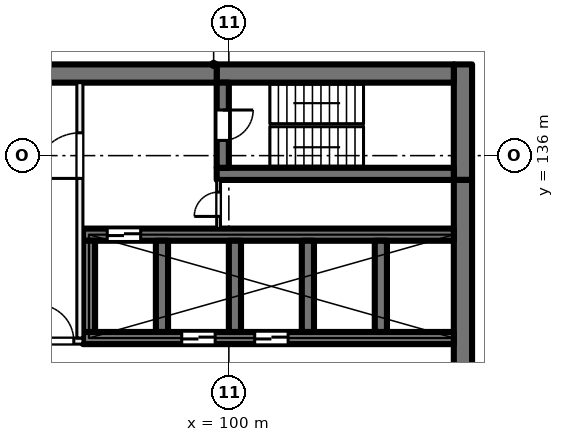
"""IFC4 building model, lengths in metres.
Left out: names, types, materials, properties, quantities, classifications, styles, units other than length and angle.
Written with IfcOpenShell. Run it as: python <this file> out.ifc"""

import sys

from ifc_helpers import new_model, si_unit, direction, frame, frame_2d, origin, place, context, subcontext, project, spatial, rectangle, extrude, element, fill, save


model = new_model("IFC4")
c1 = context("Model", 3, precision=1e-05, world=origin(), true_north=direction((0.0, 1.0)))
c2 = subcontext(c1, "Body", "Model", "MODEL_VIEW")
j1 = project(units=[si_unit("LENGTHUNIT", "METRE"), si_unit("PLANEANGLEUNIT", "RADIAN")], contexts=[c1])
p1 = place(None, origin())
s1 = spatial("IfcSite", under=j1, at=p1, CompositionType="ELEMENT")
p2 = place(p1, origin())
s2 = spatial("IfcBuilding", under=s1, at=p2, CompositionType="ELEMENT")
p3 = place(p2, frame((0.0, 0.0, 27.5)))
s3 = spatial("IfcBuildingStorey", under=s2, at=p3, CompositionType="ELEMENT", Elevation=27.5)
p4 = place(p3, frame((107.7, 139.0, 0.0), z_axis=(0.0, 0.0, 1.0), x_axis=(0.0, -1.0, 0.0)))
e1 = element("IfcWall", 1, at=p4, inside=s3, PredefinedType="SHEAR", context=c2, shape_type="SweptSolid", body=[
    extrude(rectangle(XDim=3.8, YDim=0.6, at=frame_2d((1.9, 0.0))), origin(), (0.0, 0.0, 1.0), 4.0),
])
p5 = place(p3, frame((107.7, 135.2, 0.0), z_axis=(0.0, 0.0, 1.0), x_axis=(0.0, -1.0, 0.0)))
e2 = element("IfcWall", 2, at=p5, inside=s3, PredefinedType="SHEAR", context=c2, shape_type="SweptSolid", body=[
    extrude(rectangle(XDim=14.4, YDim=0.6, at=frame_2d((7.2, 0.0))), origin(), (0.0, 0.0, 1.0), 4.0),
])
p6 = place(p3, frame((107.4, 138.7, 0.0), z_axis=(0.0, 0.0, 1.0), x_axis=(-1.0, 0.0, 0.0)))
e3 = element("IfcWall", 3, at=p6, inside=s3, PredefinedType="SHEAR", context=c2, shape_type="SweptSolid", body=[
    extrude(rectangle(XDim=7.8, YDim=0.6, at=frame_2d((3.9, 0.0))), origin(), (0.0, 0.0, 1.0), 4.0),
])
p7 = place(p3, frame((99.6, 138.7, 0.0), z_axis=(0.0, 0.0, 1.0), x_axis=(-1.0, 0.0, 0.0)))
e4 = element("IfcWall", 4, at=p7, inside=s3, PredefinedType="SHEAR", context=c2, shape_type="SweptSolid", body=[
    extrude(rectangle(XDim=8.9, YDim=0.6, at=frame_2d((4.45, 0.0))), origin(), (0.0, 0.0, 1.0), 4.0),
])
p8 = place(p3, frame((107.4, 135.4, 0.0), z_axis=(0.0, 0.0, 1.0), x_axis=(-1.0, 0.0, 0.0)))
e5 = element("IfcWall", 5, at=p8, inside=s3, PredefinedType="SHEAR", context=c2, shape_type="SweptSolid", body=[
    extrude(rectangle(XDim=7.8, YDim=0.4, at=frame_2d((3.9, 0.0))), origin(), (0.0, 0.0, 1.0), 4.0),
])
p9 = place(p3, frame((99.8, 138.4, 0.0), z_axis=(0.0, 0.0, 1.0), x_axis=(0.0, -1.0, 0.0)))
e6 = element("IfcWall", 6, at=p9, inside=s3, PredefinedType="SHEAR", context=c2, shape_type="SweptSolid", body=[
    extrude(rectangle(XDim=2.8, YDim=0.4, at=frame_2d((1.4, 0.0))), origin(), (0.0, 0.0, 1.0), 4.0),
])
p10 = place(p9, frame((0.9, 0.0, 0.0)))
e7 = element("IfcOpeningElement", 7, at=p10, cuts=e6, PredefinedType="OPENING", context=c2, shape_type="SweptSolid", body=[
    extrude(rectangle(XDim=1.0, YDim=2.1, at=frame_2d((0.5, 1.05))), frame((0.0, 0.21, 0.0), z_axis=(0.0, -1.0, 0.0), x_axis=(1.0, 0.0, 0.0)), (0.0, 0.0, 1.0), 0.42),
])
p11 = place(p3, frame((107.4, 130.0, 0.0), z_axis=(0.0, 0.0, 1.0), x_axis=(-1.0, 0.0, 0.0)))
e8 = element("IfcWall", 8, at=p11, inside=s3, PredefinedType="SHEAR", context=c2, shape_type="SweptSolid", body=[
    extrude(rectangle(XDim=12.2, YDim=0.4, at=frame_2d((6.1, 0.0))), origin(), (0.0, 0.0, 1.0), 4.0),
])
p12 = place(p11, frame((5.45, 0.0, 0.0)))
e9 = element("IfcOpeningElement", 9, at=p12, cuts=e8, PredefinedType="OPENING", context=c2, shape_type="SweptSolid", body=[
    extrude(rectangle(XDim=1.1, YDim=2.1, at=frame_2d((0.55, 1.05))), frame((0.0, 0.21, 0.0), z_axis=(0.0, -1.0, 0.0), x_axis=(1.0, 0.0, 0.0)), (0.0, 0.0, 1.0), 0.42),
])
p13 = place(p11, frame((7.85, 0.0, 0.0)))
e10 = element("IfcOpeningElement", 10, at=p13, cuts=e8, PredefinedType="OPENING", context=c2, shape_type="SweptSolid", body=[
    extrude(rectangle(XDim=1.1, YDim=2.1, at=frame_2d((0.55, 1.05))), frame((0.0, 0.21, 0.0), z_axis=(0.0, -1.0, 0.0), x_axis=(1.0, 0.0, 0.0)), (0.0, 0.0, 1.0), 0.42),
])
p14 = place(p3, frame((107.4, 133.4, 0.0), z_axis=(0.0, 0.0, 1.0), x_axis=(-1.0, 0.0, 0.0)))
e11 = element("IfcWall", 11, at=p14, inside=s3, PredefinedType="SHEAR", context=c2, shape_type="SweptSolid", body=[
    extrude(rectangle(XDim=12.2, YDim=0.4, at=frame_2d((6.1, 0.0))), origin(), (0.0, 0.0, 1.0), 4.0),
])
p15 = place(p14, frame((10.3, 0.0, 0.0)))
e12 = element("IfcOpeningElement", 12, at=p15, cuts=e11, PredefinedType="OPENING", context=c2, shape_type="SweptSolid", body=[
    extrude(rectangle(XDim=1.1, YDim=2.1, at=frame_2d((0.55, 1.05))), frame((0.0, 0.21, 0.0), z_axis=(0.0, -1.0, 0.0), x_axis=(1.0, 0.0, 0.0)), (0.0, 0.0, 1.0), 0.42),
])
for number, where, z_axis, x_axis in (
    (13, (105.0, 133.2, 0.0), (0.0, 0.0, 1.0), (0.0, -1.0, 0.0)),
    (14, (102.6, 133.2, 0.0), (0.0, 0.0, 1.0), (0.0, -1.0, 0.0)),
    (15, (100.2, 133.2, 0.0), (0.0, 0.0, 1.0), (0.0, -1.0, 0.0)),
    (16, (97.8, 133.2, 0.0), (0.0, 0.0, 1.0), (0.0, -1.0, 0.0)),
    (17, (95.4, 133.2, 0.0), (0.0, 0.0, 1.0), (0.0, -1.0, 0.0)),
):
    element("IfcWall", number, at=place(p3, frame(where, z_axis=z_axis, x_axis=x_axis)), inside=s3, PredefinedType="SHEAR", context=c2, shape_type="SweptSolid", body=[
        extrude(rectangle(XDim=3.0, YDim=0.4, at=frame_2d((1.5, 0.0))), origin(), (0.0, 0.0, 1.0), 4.0),
    ])
p16 = place(p3, frame((91.4, 129.9, 0.0), z_axis=(0.0, 0.0, 1.0), x_axis=(1.0, 0.0, 0.0)))
e18 = element("IfcWall", 18, at=p16, inside=s3, PredefinedType="PARTITIONING", context=c2, shape_type="SweptSolid", body=[
    extrude(rectangle(XDim=3.8, YDim=0.2, at=frame_2d((1.9, 0.0))), origin(), (0.0, 0.0, 1.0), 3.625),
])
p17 = place(p16, frame((2.3, 0.0, 0.0)))
e19 = element("IfcOpeningElement", 19, at=p17, cuts=e18, PredefinedType="OPENING", context=c2, shape_type="SweptSolid", body=[
    extrude(rectangle(XDim=1.2, YDim=2.1, at=frame_2d((0.6, 1.05))), frame((0.0, 0.11, 0.0), z_axis=(0.0, -1.0, 0.0), x_axis=(1.0, 0.0, 0.0)), (0.0, 0.0, 1.0), 0.22),
])
p18 = place(p3, frame((95.1, 130.0, 0.0), z_axis=(0.0, 0.0, 1.0), x_axis=(0.0, 1.0, 0.0)))
e20 = element("IfcWall", 20, at=p18, inside=s3, PredefinedType="PARTITIONING", context=c2, shape_type="SweptSolid", body=[
    extrude(rectangle(XDim=8.4, YDim=0.2, at=frame_2d((4.2, 0.0))), origin(), (0.0, 0.0, 1.0), 3.625),
])
p19 = place(p18, frame((5.25, 0.0, 0.0)))
e21 = element("IfcOpeningElement", 21, at=p19, cuts=e20, PredefinedType="OPENING", context=c2, shape_type="SweptSolid", body=[
    extrude(rectangle(XDim=1.5, YDim=2.1, at=frame_2d((0.75, 1.05))), frame((0.0, 0.11, 0.0), z_axis=(0.0, -1.0, 0.0), x_axis=(1.0, 0.0, 0.0)), (0.0, 0.0, 1.0), 0.22),
])
p20 = place(p3, frame((99.663, 133.6, 0.0), z_axis=(0.0, 0.0, 1.0), x_axis=(0.0, 1.0, 0.0)))
e22 = element("IfcWall", 22, at=p20, inside=s3, PredefinedType="PARTITIONING", context=c2, shape_type="SweptSolid", body=[
    extrude(rectangle(XDim=1.6, YDim=0.125, at=frame_2d((0.8, 0.0))), origin(), (0.0, 0.0, 1.0), 3.625),
])
p21 = place(p20, frame((0.4, 0.0, 0.0)))
e23 = element("IfcOpeningElement", 23, at=p21, cuts=e22, PredefinedType="OPENING", context=c2, shape_type="SweptSolid", body=[
    extrude(rectangle(XDim=0.8, YDim=2.1, at=frame_2d((0.4, 1.05))), frame((0.0, 0.073, 0.0), z_axis=(0.0, -1.0, 0.0), x_axis=(1.0, 0.0, 0.0)), (0.0, 0.0, 1.0), 0.145),
])
p22 = place(p12, origin())
e24 = element("IfcDoor", 24, at=p22, inside=s3, OperationType="DOUBLE_DOOR_SLIDING", PredefinedType="DOOR", context=c2, shape_type="SweptSolid", body=[
    extrude(rectangle(XDim=1.1, YDim=2.1, at=frame_2d((0.55, 1.05))), frame((0.0, 0.025, 0.0), z_axis=(0.0, -1.0, 0.0), x_axis=(1.0, 0.0, 0.0)), (0.0, 0.0, 1.0), 0.05),
])
fill(e9, e24)
p23 = place(p13, origin())
e25 = element("IfcDoor", 25, at=p23, inside=s3, OperationType="DOUBLE_DOOR_SLIDING", PredefinedType="DOOR", context=c2, shape_type="SweptSolid", body=[
    extrude(rectangle(XDim=1.1, YDim=2.1, at=frame_2d((0.55, 1.05))), frame((0.0, 0.025, 0.0), z_axis=(0.0, -1.0, 0.0), x_axis=(1.0, 0.0, 0.0)), (0.0, 0.0, 1.0), 0.05),
])
fill(e10, e25)
p24 = place(p17, origin())
e26 = element("IfcDoor", 26, at=p24, inside=s3, OperationType="DOUBLE_DOOR_SINGLE_SWING", PredefinedType="DOOR", context=c2, shape_type="SweptSolid", body=[
    extrude(rectangle(XDim=1.2, YDim=2.1, at=frame_2d((0.6, 1.05))), frame((0.0, 0.025, 0.0), z_axis=(0.0, -1.0, 0.0), x_axis=(1.0, 0.0, 0.0)), (0.0, 0.0, 1.0), 0.05),
])
fill(e19, e26)
p25 = place(p19, origin())
e27 = element("IfcDoor", 27, at=p25, inside=s3, OperationType="DOUBLE_DOOR_SINGLE_SWING", PredefinedType="DOOR", context=c2, shape_type="SweptSolid", body=[
    extrude(rectangle(XDim=1.5, YDim=2.1, at=frame_2d((0.75, 1.05))), frame((0.0, 0.025, 0.0), z_axis=(0.0, -1.0, 0.0), x_axis=(1.0, 0.0, 0.0)), (0.0, 0.0, 1.0), 0.05),
])
fill(e21, e27)
p26 = place(p10, origin())
e28 = element("IfcDoor", 28, at=p26, inside=s3, OperationType="SINGLE_SWING_RIGHT", PredefinedType="DOOR", context=c2, shape_type="SweptSolid", body=[
    extrude(rectangle(XDim=1.0, YDim=2.1, at=frame_2d((0.5, 1.05))), frame((0.0, 0.025, 0.0), z_axis=(0.0, -1.0, 0.0), x_axis=(1.0, 0.0, 0.0)), (0.0, 0.0, 1.0), 0.05),
])
fill(e7, e28)
p27 = place(p21, origin())
e29 = element("IfcDoor", 29, at=p27, inside=s3, OperationType="SINGLE_SWING_LEFT", PredefinedType="DOOR", context=c2, shape_type="SweptSolid", body=[
    extrude(rectangle(XDim=0.8, YDim=2.1, at=frame_2d((0.4, 1.05))), frame((0.0, 0.025, 0.0), z_axis=(0.0, -1.0, 0.0), x_axis=(1.0, 0.0, 0.0)), (0.0, 0.0, 1.0), 0.05),
])
fill(e23, e29)
p28 = place(p15, origin())
e30 = element("IfcDoor", 30, at=p28, inside=s3, OperationType="DOUBLE_DOOR_SLIDING", PredefinedType="DOOR", context=c2, shape_type="SweptSolid", body=[
    extrude(rectangle(XDim=1.1, YDim=2.1, at=frame_2d((0.55, 1.05))), frame((0.0, 0.025, 0.0), z_axis=(0.0, -1.0, 0.0), x_axis=(1.0, 0.0, 0.0)), (0.0, 0.0, 1.0), 0.05),
])
fill(e12, e30)
save(model, sys.argv[1])
